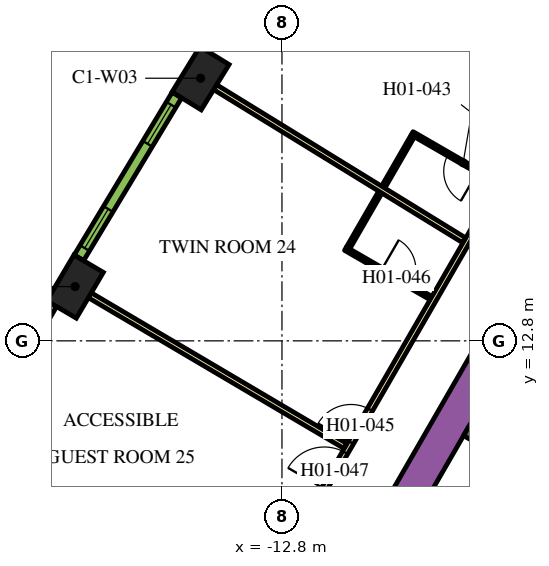
"""IFC4 building model, lengths in metres.
Left out: names, types, materials, properties, quantities, classifications, styles, units other than length and angle.
Written with IfcOpenShell. Run it as: python <this file> out.ifc"""

import sys

from ifc_helpers import new_model, si_unit, direction, frame, frame_2d, origin, origin_2d, place, context, subcontext, project, spatial, rectangle, extrude, element, fill, save


model = new_model("IFC4")
c1 = context("Model", 3, precision=1e-05, world=origin(), true_north=direction((0.0, 1.0)))
c2 = subcontext(c1, "Body", "Model", "MODEL_VIEW")
j1 = project(units=[si_unit("LENGTHUNIT", "METRE"), si_unit("PLANEANGLEUNIT", "RADIAN")], contexts=[c1])
p1 = place(None, origin())
s1 = spatial("IfcSite", under=j1, at=p1, CompositionType="ELEMENT")
p2 = place(p1, origin())
s2 = spatial("IfcBuilding", under=s1, at=p2, CompositionType="ELEMENT")
p3 = place(p2, frame((0.0, 0.0, 31.5)))
s3 = spatial("IfcBuildingStorey", under=s2, at=p3, CompositionType="ELEMENT", Elevation=31.5)
for number, where, z_axis, x_axis in (
    (1, (-14.942, 19.71, 0.0), (0.0, 0.0, 1.0), (-0.524, -0.852, 0.0)),
    (2, (-18.243, 14.228, 0.0), (0.0, 0.0, 1.0), (-0.508, -0.861, 0.0)),
):
    element("IfcColumn", number, at=place(p3, frame(where, z_axis=z_axis, x_axis=x_axis)), inside=s3, PredefinedType="COLUMN", context=c2, shape_type="SweptSolid", body=[
        extrude(rectangle(XDim=1.4, YDim=0.9, at=origin_2d()), origin(), (0.0, 0.0, 1.0), 3.9),
    ])
p4 = place(p3, frame((-15.36, -1.503, 0.0), z_axis=(0.0, 0.0, 1.0), x_axis=(0.50000389221, 0.866023156604, 0.0)))
e3 = element("IfcWall", 3, at=p4, inside=s3, PredefinedType="SOLIDWALL", context=c2, shape_type="SweptSolid", body=[
    extrude(rectangle(XDim=21.0, YDim=0.9, at=frame_2d((10.5, 0.0))), origin(), (0.0, 0.0, 1.0), 3.9),
])
p5 = place(p3, frame((-7.959, 10.415, 0.0), z_axis=(0.0, 0.0, 1.0), x_axis=(0.866020958405, -0.500007699544, 0.0)))
e4 = element("IfcWall", 4, at=p5, inside=s3, PredefinedType="SOLIDWALL", context=c2, shape_type="SweptSolid", body=[
    extrude(rectangle(XDim=4.1, YDim=0.25, at=frame_2d((2.05, 0.0))), origin(), (0.0, 0.0, 1.0), 3.9),
])
p6 = place(p3, frame((-6.008, 9.144, 0.0), z_axis=(0.0, 0.0, 1.0), x_axis=(-0.500006956611, -0.866021387346, 0.0)))
e5 = element("IfcWall", 5, at=p6, inside=s3, PredefinedType="SOLIDWALL", context=c2, shape_type="SweptSolid", body=[
    extrude(rectangle(XDim=9.83, YDim=0.25, at=frame_2d((4.915, 0.0))), origin(), (0.0, 0.0, 1.0), 3.9),
])
p7 = place(p6, frame((6.985, 0.0, 0.0)))
e6 = element("IfcOpeningElement", 6, at=p7, cuts=e5, PredefinedType="OPENING", context=c2, shape_type="SweptSolid", body=[
    extrude(rectangle(XDim=0.9, YDim=2.1, at=frame_2d((0.45, 1.05))), frame((0.0, 0.135, 0.0), z_axis=(0.0, -1.0, 0.0), x_axis=(1.0, 0.0, 0.0)), (0.0, 0.0, 1.0), 0.27),
])
p8 = place(p3, frame((-19.081, -3.9, 0.0), z_axis=(0.0, 0.0, 1.0), x_axis=(0.499998313975, 0.866026377209, 0.0)))
e7 = element("IfcWall", 7, at=p8, inside=s3, PredefinedType="PARTITIONING", context=c2, shape_type="SweptSolid", body=[
    extrude(rectangle(XDim=25.766, YDim=0.15, at=frame_2d((12.883, 0.0))), origin(), (0.0, 0.0, 1.0), 2.75),
])
p9 = place(p8, frame((24.586, 0.0, 0.0)))
e8 = element("IfcOpeningElement", 8, at=p9, cuts=e7, PredefinedType="OPENING", context=c2, shape_type="SweptSolid", body=[
    extrude(rectangle(XDim=1.0, YDim=2.1, at=frame_2d((0.5, 1.05))), frame((0.0, 0.085, 0.0), z_axis=(0.0, -1.0, 0.0), x_axis=(1.0, 0.0, 0.0)), (0.0, 0.0, 1.0), 0.17),
])
p10 = place(p8, frame((16.196, 0.0, 0.0)))
e9 = element("IfcOpeningElement", 9, at=p10, cuts=e7, PredefinedType="OPENING", context=c2, shape_type="SweptSolid", body=[
    extrude(rectangle(XDim=1.0, YDim=2.1, at=frame_2d((0.5, 1.05))), frame((0.0, 0.085, 0.0), z_axis=(0.0, -1.0, 0.0), x_axis=(1.0, 0.0, 0.0)), (0.0, 0.0, 1.0), 0.17),
])
p11 = place(p8, frame((14.789, 0.0, 0.0)))
e10 = element("IfcOpeningElement", 10, at=p11, cuts=e7, PredefinedType="OPENING", context=c2, shape_type="SweptSolid", body=[
    extrude(rectangle(XDim=1.1, YDim=2.1, at=frame_2d((0.55, 1.05))), frame((0.0, 0.085, 0.0), z_axis=(0.0, -1.0, 0.0), x_axis=(1.0, 0.0, 0.0)), (0.0, 0.0, 1.0), 0.17),
])
p12 = place(p8, frame((3.698, 0.0, 0.0)))
e11 = element("IfcOpeningElement", 11, at=p12, cuts=e7, PredefinedType="OPENING", context=c2, shape_type="SweptSolid", body=[
    extrude(rectangle(XDim=1.0, YDim=2.1, at=frame_2d((0.5, 1.05))), frame((0.0, 0.085, 0.0), z_axis=(0.0, -1.0, 0.0), x_axis=(1.0, 0.0, 0.0)), (0.0, 0.0, 1.0), 0.17),
])
p13 = place(p8, frame((1.531, 0.0, 0.0)))
e12 = element("IfcOpeningElement", 12, at=p13, cuts=e7, PredefinedType="OPENING", context=c2, shape_type="SweptSolid", body=[
    extrude(rectangle(XDim=0.9, YDim=2.1, at=frame_2d((0.45, 1.05))), frame((0.0, 0.085, 0.0), z_axis=(0.0, -1.0, 0.0), x_axis=(1.0, 0.0, 0.0)), (0.0, 0.0, 1.0), 0.17),
])
p14 = place(p3, frame((-17.856, 13.999, 0.0), z_axis=(0.0, 0.0, 1.0), x_axis=(0.861371519381, -0.507975497047, 0.0)))
e13 = element("IfcWall", 13, at=p14, inside=s3, PredefinedType="PARTITIONING", context=c2, shape_type="SweptSolid", body=[
    extrude(rectangle(XDim=7.804, YDim=0.15, at=frame_2d((3.902, 0.0))), origin(), (0.0, 0.0, 1.0), 2.75),
])
p15 = place(p3, frame((-14.558, 19.475, 0.0), z_axis=(0.0, 0.0, 1.0), x_axis=(0.851829455142, -0.523819223925, 0.0)))
e14 = element("IfcWall", 14, at=p15, inside=s3, PredefinedType="PARTITIONING", context=c2, shape_type="SweptSolid", body=[
    extrude(rectangle(XDim=7.688, YDim=0.15, at=frame_2d((3.844, 0.0))), origin(), (0.0, 0.0, 1.0), 2.75),
])
p16 = place(p3, frame((-11.16, 24.888, 0.0), z_axis=(0.0, 0.0, 1.0), x_axis=(0.84199813156, -0.539480441211, 0.0)))
e15 = element("IfcWall", 15, at=p16, inside=s3, PredefinedType="PARTITIONING", context=c2, shape_type="SweptSolid", body=[
    extrude(rectangle(XDim=11.638, YDim=0.15, at=frame_2d((5.819, 0.0))), origin(), (0.0, 0.0, 1.0), 2.75),
])
p17 = place(p3, frame((-7.124, 16.961, 0.0), z_axis=(0.0, 0.0, 1.0), x_axis=(-0.866021400173, 0.500006934395, 0.0)))
e16 = element("IfcWall", 16, at=p17, inside=s3, PredefinedType="PARTITIONING", context=c2, shape_type="SweptSolid", body=[
    extrude(rectangle(XDim=2.6, YDim=0.1, at=frame_2d((1.3, 0.0))), origin(), (0.0, 0.0, 1.0), 2.75),
])
p18 = place(p17, frame((0.6, 0.0, 0.0)))
e17 = element("IfcOpeningElement", 17, at=p18, cuts=e16, PredefinedType="OPENING", context=c2, shape_type="SweptSolid", body=[
    extrude(rectangle(XDim=0.9, YDim=2.1, at=frame_2d((0.45, 1.05))), frame((0.0, 0.06, 0.0), z_axis=(0.0, -1.0, 0.0), x_axis=(1.0, 0.0, 0.0)), (0.0, 0.0, 1.0), 0.12),
])
p19 = place(p3, frame((-9.362, 18.184, 0.0), z_axis=(0.0, 0.0, 1.0), x_axis=(-0.499992328818, -0.866029832698, 0.0)))
e18 = element("IfcWall", 18, at=p19, inside=s3, PredefinedType="PARTITIONING", context=c2, shape_type="SweptSolid", body=[
    extrude(rectangle(XDim=1.54, YDim=0.1, at=frame_2d((0.77, 0.0))), origin(), (0.0, 0.0, 1.0), 2.75),
])
p20 = place(p3, frame((-11.129, 15.224, 0.0), z_axis=(0.0, 0.0, 1.0), x_axis=(0.866021400173, -0.500006934395, 0.0)))
e19 = element("IfcWall", 19, at=p20, inside=s3, PredefinedType="PARTITIONING", context=c2, shape_type="SweptSolid", body=[
    extrude(rectangle(XDim=2.6, YDim=0.1, at=frame_2d((1.3, 0.0))), origin(), (0.0, 0.0, 1.0), 2.75),
])
p21 = place(p20, frame((1.1, 0.0, 0.0)))
e20 = element("IfcOpeningElement", 20, at=p21, cuts=e19, PredefinedType="OPENING", context=c2, shape_type="SweptSolid", body=[
    extrude(rectangle(XDim=0.9, YDim=2.1, at=frame_2d((0.45, 1.05))), frame((0.0, 0.06, 0.0), z_axis=(0.0, -1.0, 0.0), x_axis=(1.0, 0.0, 0.0)), (0.0, 0.0, 1.0), 0.12),
])
p22 = place(p3, frame((-11.061, 15.242, 0.0), z_axis=(0.0, 0.0, 1.0), x_axis=(0.499976720371, 0.866038843867, 0.0)))
e21 = element("IfcWall", 21, at=p22, inside=s3, PredefinedType="PARTITIONING", context=c2, shape_type="SweptSolid", body=[
    extrude(rectangle(XDim=1.69, YDim=0.1, at=frame_2d((0.845, 0.0))), origin(), (0.0, 0.0, 1.0), 2.75),
])
p23 = place(p3, frame((-12.17, 24.699, 0.0), z_axis=(0.0, 0.0, 1.0), x_axis=(-0.531688286542, -0.846940119462, 0.0)))
e22 = element("IfcWall", 22, at=p23, inside=s3, PredefinedType="SOLIDWALL", context=c2, shape_type="SweptSolid", body=[
    extrude(rectangle(XDim=4.998, YDim=0.29, at=frame_2d((2.499, 0.0))), origin(), (0.0, 0.0, 1.0), 3.65),
])
p24 = place(p23, frame((0.297, 0.0, 0.9)))
e23 = element("IfcOpeningElement", 23, at=p24, cuts=e22, PredefinedType="OPENING", context=c2, shape_type="SweptSolid", body=[
    extrude(rectangle(XDim=1.2, YDim=2.15, at=frame_2d((0.6, 1.075))), frame((0.0, 0.155, 0.0), z_axis=(0.0, -1.0, 0.0), x_axis=(1.0, 0.0, 0.0)), (0.0, 0.0, 1.0), 0.31),
])
p25 = place(p23, frame((3.501, 0.0, 0.9)))
e24 = element("IfcOpeningElement", 24, at=p25, cuts=e22, PredefinedType="OPENING", context=c2, shape_type="SweptSolid", body=[
    extrude(rectangle(XDim=1.2, YDim=2.15, at=frame_2d((0.6, 1.075))), frame((0.0, 0.155, 0.0), z_axis=(0.0, -1.0, 0.0), x_axis=(1.0, 0.0, 0.0)), (0.0, 0.0, 1.0), 0.31),
])
p26 = place(p3, frame((-15.564, 19.267, 0.0), z_axis=(0.0, 0.0, 1.0), x_axis=(-0.515938796285, -0.856625448191, 0.0)))
e25 = element("IfcWall", 25, at=p26, inside=s3, PredefinedType="SOLIDWALL", context=c2, shape_type="SweptSolid", body=[
    extrude(rectangle(XDim=4.998, YDim=0.29, at=frame_2d((2.499, 0.0))), origin(), (0.0, 0.0, 1.0), 3.65),
])
p27 = place(p26, frame((0.297, 0.0, 0.9)))
e26 = element("IfcOpeningElement", 26, at=p27, cuts=e25, PredefinedType="OPENING", context=c2, shape_type="SweptSolid", body=[
    extrude(rectangle(XDim=1.2, YDim=2.15, at=frame_2d((0.6, 1.075))), frame((0.0, 0.155, 0.0), z_axis=(0.0, -1.0, 0.0), x_axis=(1.0, 0.0, 0.0)), (0.0, 0.0, 1.0), 0.31),
])
p28 = place(p26, frame((3.501, 0.0, 0.9)))
e27 = element("IfcOpeningElement", 27, at=p28, cuts=e25, PredefinedType="OPENING", context=c2, shape_type="SweptSolid", body=[
    extrude(rectangle(XDim=1.2, YDim=2.15, at=frame_2d((0.6, 1.075))), frame((0.0, 0.155, 0.0), z_axis=(0.0, -1.0, 0.0), x_axis=(1.0, 0.0, 0.0)), (0.0, 0.0, 1.0), 0.31),
])
p29 = place(p3, frame((-18.858, 13.773, 0.0), z_axis=(0.0, 0.0, 1.0), x_axis=(-0.50002123722, -0.866013142123, 0.0)))
e28 = element("IfcWall", 28, at=p29, inside=s3, PredefinedType="SOLIDWALL", context=c2, shape_type="SweptSolid", body=[
    extrude(rectangle(XDim=4.998, YDim=0.29, at=frame_2d((2.499, 0.0))), origin(), (0.0, 0.0, 1.0), 3.65),
])
p30 = place(p29, frame((0.297, 0.0, 0.9)))
e29 = element("IfcOpeningElement", 29, at=p30, cuts=e28, PredefinedType="OPENING", context=c2, shape_type="SweptSolid", body=[
    extrude(rectangle(XDim=1.2, YDim=2.15, at=frame_2d((0.6, 1.075))), frame((0.0, 0.155, 0.0), z_axis=(0.0, -1.0, 0.0), x_axis=(1.0, 0.0, 0.0)), (0.0, 0.0, 1.0), 0.31),
])
p31 = place(p29, frame((3.501, 0.0, 0.9)))
e30 = element("IfcOpeningElement", 30, at=p31, cuts=e28, PredefinedType="OPENING", context=c2, shape_type="SweptSolid", body=[
    extrude(rectangle(XDim=1.2, YDim=2.15, at=frame_2d((0.6, 1.075))), frame((0.0, 0.155, 0.0), z_axis=(0.0, -1.0, 0.0), x_axis=(1.0, 0.0, 0.0)), (0.0, 0.0, 1.0), 0.31),
])
p32 = place(p18, origin())
e31 = element("IfcDoor", 31, at=p32, inside=s3, OperationType="SINGLE_SWING_LEFT", PredefinedType="DOOR", context=c2, shape_type="SweptSolid", body=[
    extrude(rectangle(XDim=0.9, YDim=2.1, at=frame_2d((0.45, 1.05))), frame((0.0, 0.025, 0.0), z_axis=(0.0, -1.0, 0.0), x_axis=(1.0, 0.0, 0.0)), (0.0, 0.0, 1.0), 0.05),
])
fill(e17, e31)
p33 = place(p10, origin())
e32 = element("IfcDoor", 32, at=p33, inside=s3, OperationType="SINGLE_SWING_LEFT", PredefinedType="DOOR", context=c2, shape_type="SweptSolid", body=[
    extrude(rectangle(XDim=1.0, YDim=2.1, at=frame_2d((0.5, 1.05))), frame((0.0, 0.025, 0.0), z_axis=(0.0, -1.0, 0.0), x_axis=(1.0, 0.0, 0.0)), (0.0, 0.0, 1.0), 0.05),
])
fill(e9, e32)
p34 = place(p21, origin())
e33 = element("IfcDoor", 33, at=p34, inside=s3, OperationType="SINGLE_SWING_RIGHT", PredefinedType="DOOR", context=c2, shape_type="SweptSolid", body=[
    extrude(rectangle(XDim=0.9, YDim=2.1, at=frame_2d((0.45, 1.05))), frame((0.0, 0.025, 0.0), z_axis=(0.0, -1.0, 0.0), x_axis=(1.0, 0.0, 0.0)), (0.0, 0.0, 1.0), 0.05),
])
fill(e20, e33)
p35 = place(p11, origin())
e34 = element("IfcDoor", 34, at=p35, inside=s3, OperationType="SINGLE_SWING_RIGHT", PredefinedType="DOOR", context=c2, shape_type="SweptSolid", body=[
    extrude(rectangle(XDim=1.1, YDim=2.1, at=frame_2d((0.55, 1.05))), frame((0.0, 0.025, 0.0), z_axis=(0.0, -1.0, 0.0), x_axis=(1.0, 0.0, 0.0)), (0.0, 0.0, 1.0), 0.05),
])
fill(e10, e34)
p36 = place(p27, origin())
e35 = element("IfcWindow", 35, at=p36, inside=s3, PartitioningType="DOUBLE_PANEL_VERTICAL", PredefinedType="WINDOW", context=c2, shape_type="SweptSolid", body=[
    extrude(rectangle(XDim=1.2, YDim=2.15, at=frame_2d((0.6, 1.075))), frame((0.0, 0.015, 0.0), z_axis=(0.0, -1.0, 0.0), x_axis=(1.0, 0.0, 0.0)), (0.0, 0.0, 1.0), 0.06),
])
fill(e26, e35)
p37 = place(p28, origin())
e36 = element("IfcWindow", 36, at=p37, inside=s3, PartitioningType="DOUBLE_PANEL_VERTICAL", PredefinedType="WINDOW", context=c2, shape_type="SweptSolid", body=[
    extrude(rectangle(XDim=1.2, YDim=2.15, at=frame_2d((0.6, 1.075))), frame((0.0, 0.015, 0.0), z_axis=(0.0, -1.0, 0.0), x_axis=(1.0, 0.0, 0.0)), (0.0, 0.0, 1.0), 0.06),
])
fill(e27, e36)
save(model, sys.argv[1])
